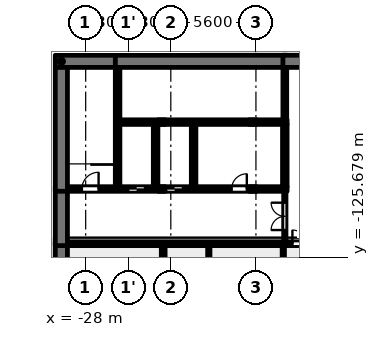
"""IFC4 building model, lengths in metres.
Left out: names, types, materials, properties, quantities, classifications, styles, units other than length and angle.
Written with IfcOpenShell. Run it as: python <this file> out.ifc"""

import sys

from ifc_helpers import new_model, si_unit, direction, frame, frame_2d, origin, origin_2d, place, context, subcontext, project, spatial, rectangle, extrude, element, fill, save


model = new_model("IFC4")
c1 = context("Model", 3, precision=1e-05, world=origin(), true_north=direction((0.0, 1.0)))
c2 = subcontext(c1, "Body", "Model", "MODEL_VIEW")
j1 = project(units=[si_unit("LENGTHUNIT", "METRE"), si_unit("PLANEANGLEUNIT", "RADIAN")], contexts=[c1])
p1 = place(None, origin())
s1 = spatial("IfcSite", under=j1, at=p1, CompositionType="ELEMENT")
p2 = place(p1, origin())
s2 = spatial("IfcBuilding", under=s1, at=p2, CompositionType="ELEMENT")
p3 = place(p2, frame((0.0, 0.0, 20.9)))
s3 = spatial("IfcBuildingStorey", under=s2, at=p3, CompositionType="ELEMENT", Elevation=20.9)
p4 = place(p3, frame((-29.2, -124.8, 0.0), z_axis=(0.0, 0.0, 1.0), x_axis=(1.0, 0.0, 0.0)))
e1 = element("IfcWall", 1, at=p4, inside=s3, PredefinedType="SOLIDWALL", context=c2, shape_type="SweptSolid", body=[
    extrude(rectangle(XDim=16.8, YDim=0.25, at=frame_2d((8.4, 0.0))), origin(), (0.0, 0.0, 1.0), 4.5),
])
p5 = place(p4, frame((14.8, 0.0, 0.0)))
e2 = element("IfcOpeningElement", 2, at=p5, cuts=e1, PredefinedType="OPENING", context=c2, shape_type="SweptSolid", body=[
    extrude(rectangle(XDim=1.8, YDim=2.1, at=frame_2d((0.9, 1.05))), frame((0.0, 0.135, 0.0), z_axis=(0.0, -1.0, 0.0), x_axis=(1.0, 0.0, 0.0)), (0.0, 0.0, 1.0), 0.27),
])
p6 = place(p3, frame((-29.2, -121.2, 0.0), z_axis=(0.0, 0.0, 1.0), x_axis=(1.0, 0.0, 0.0)))
e3 = element("IfcWall", 3, at=p6, inside=s3, PredefinedType="SOLIDWALL", context=c2, shape_type="SweptSolid", body=[
    extrude(rectangle(XDim=14.45, YDim=0.3, at=frame_2d((7.225, 0.0))), origin(), (0.0, 0.0, 1.0), 4.5),
])
p7 = place(p6, frame((4.0, 0.0, 0.0)))
e4 = element("IfcOpeningElement", 4, at=p7, cuts=e3, PredefinedType="OPENING", context=c2, shape_type="SweptSolid", body=[
    extrude(rectangle(XDim=1.1, YDim=2.1, at=frame_2d((0.55, 1.05))), frame((0.0, 0.16, 0.0), z_axis=(0.0, -1.0, 0.0), x_axis=(1.0, 0.0, 0.0)), (0.0, 0.0, 1.0), 0.32),
])
p8 = place(p6, frame((6.5, 0.0, 0.0)))
e5 = element("IfcOpeningElement", 5, at=p8, cuts=e3, PredefinedType="OPENING", context=c2, shape_type="SweptSolid", body=[
    extrude(rectangle(XDim=1.1, YDim=2.1, at=frame_2d((0.55, 1.05))), frame((0.0, 0.16, 0.0), z_axis=(0.0, -1.0, 0.0), x_axis=(1.0, 0.0, 0.0)), (0.0, 0.0, 1.0), 0.32),
])
p9 = place(p6, frame((0.95, 0.0, 0.0)))
e6 = element("IfcOpeningElement", 6, at=p9, cuts=e3, PredefinedType="OPENING", context=c2, shape_type="SweptSolid", body=[
    extrude(rectangle(XDim=1.1, YDim=2.1, at=frame_2d((0.55, 1.05))), frame((0.0, 0.16, 0.0), z_axis=(0.0, -1.0, 0.0), x_axis=(1.0, 0.0, 0.0)), (0.0, 0.0, 1.0), 0.32),
])
p10 = place(p6, frame((10.8, 0.0, 0.0)))
e7 = element("IfcOpeningElement", 7, at=p10, cuts=e3, PredefinedType="OPENING", context=c2, shape_type="SweptSolid", body=[
    extrude(rectangle(XDim=1.0, YDim=2.1, at=frame_2d((0.5, 1.05))), frame((0.0, 0.16, 0.0), z_axis=(0.0, -1.0, 0.0), x_axis=(1.0, 0.0, 0.0)), (0.0, 0.0, 1.0), 0.32),
])
p11 = place(p3, frame((-25.75, -116.8, 0.0), z_axis=(0.0, 0.0, 1.0), x_axis=(1.0, 0.0, 0.0)))
e8 = element("IfcWall", 8, at=p11, inside=s3, PredefinedType="SOLIDWALL", context=c2, shape_type="SweptSolid", body=[
    extrude(rectangle(XDim=11.0, YDim=0.3, at=frame_2d((5.5, 0.0))), origin(), (0.0, 0.0, 1.0), 4.5),
])
p12 = place(p3, frame((-30.0, -112.8, 0.0), z_axis=(0.0, 0.0, 1.0), x_axis=(1.0, 0.0, 0.0)))
e9 = element("IfcWall", 9, at=p12, inside=s3, PredefinedType="SOLIDWALL", context=c2, shape_type="SweptSolid", body=[
    extrude(rectangle(XDim=4.25, YDim=0.8, at=frame_2d((2.125, 0.0))), origin(), (0.0, 0.0, 1.0), 4.5),
])
p13 = place(p3, frame((-26.05, -112.8, 0.0), z_axis=(0.0, 0.0, 1.0), x_axis=(1.0, 0.0, 0.0)))
e10 = element("IfcWall", 10, at=p13, inside=s3, PredefinedType="SOLIDWALL", context=c2, shape_type="SweptSolid", body=[
    extrude(rectangle(XDim=11.275, YDim=0.8, at=frame_2d((5.637, 0.0))), origin(), (0.0, 0.0, 1.0), 4.5),
])
p14 = place(p3, frame((-15.025, -112.8, 0.0), z_axis=(0.0, 0.0, 1.0), x_axis=(1.0, 0.0, 0.0)))
e11 = element("IfcWall", 11, at=p14, inside=s3, PredefinedType="SOLIDWALL", context=c2, shape_type="SweptSolid", body=[
    extrude(rectangle(XDim=30.05, YDim=0.8, at=frame_2d((15.025, 0.0))), origin(), (0.0, 0.0, 1.0), 4.5),
])
p15 = place(p14, frame((2.125, 0.0, 0.9)))
e12 = element("IfcOpeningElement", 12, at=p15, cuts=e11, PredefinedType="OPENING", context=c2, shape_type="SweptSolid", body=[
    extrude(rectangle(XDim=1.8, YDim=1.5, at=frame_2d((0.9, 0.75))), frame((0.0, 0.41, 0.0), z_axis=(0.0, -1.0, 0.0), x_axis=(1.0, 0.0, 0.0)), (0.0, 0.0, 1.0), 0.82),
])
p16 = place(p14, frame((5.125, 0.0, 0.9)))
e13 = element("IfcOpeningElement", 13, at=p16, cuts=e11, PredefinedType="OPENING", context=c2, shape_type="SweptSolid", body=[
    extrude(rectangle(XDim=1.8, YDim=1.5, at=frame_2d((0.9, 0.75))), frame((0.0, 0.41, 0.0), z_axis=(0.0, -1.0, 0.0), x_axis=(1.0, 0.0, 0.0)), (0.0, 0.0, 1.0), 0.82),
])
p17 = place(p14, frame((8.125, 0.0, 0.9)))
e14 = element("IfcOpeningElement", 14, at=p17, cuts=e11, PredefinedType="OPENING", context=c2, shape_type="SweptSolid", body=[
    extrude(rectangle(XDim=1.8, YDim=1.5, at=frame_2d((0.9, 0.75))), frame((0.0, 0.41, 0.0), z_axis=(0.0, -1.0, 0.0), x_axis=(1.0, 0.0, 0.0)), (0.0, 0.0, 1.0), 0.82),
])
p18 = place(p14, frame((11.125, 0.0, 0.9)))
e15 = element("IfcOpeningElement", 15, at=p18, cuts=e11, PredefinedType="OPENING", context=c2, shape_type="SweptSolid", body=[
    extrude(rectangle(XDim=1.8, YDim=1.5, at=frame_2d((0.9, 0.75))), frame((0.0, 0.41, 0.0), z_axis=(0.0, -1.0, 0.0), x_axis=(1.0, 0.0, 0.0)), (0.0, 0.0, 1.0), 0.82),
])
p19 = place(p14, frame((14.125, 0.0, 0.9)))
e16 = element("IfcOpeningElement", 16, at=p19, cuts=e11, PredefinedType="OPENING", context=c2, shape_type="SweptSolid", body=[
    extrude(rectangle(XDim=1.8, YDim=1.5, at=frame_2d((0.9, 0.75))), frame((0.0, 0.41, 0.0), z_axis=(0.0, -1.0, 0.0), x_axis=(1.0, 0.0, 0.0)), (0.0, 0.0, 1.0), 0.82),
])
p20 = place(p14, frame((17.125, 0.0, 0.9)))
e17 = element("IfcOpeningElement", 17, at=p20, cuts=e11, PredefinedType="OPENING", context=c2, shape_type="SweptSolid", body=[
    extrude(rectangle(XDim=1.8, YDim=1.5, at=frame_2d((0.9, 0.75))), frame((0.0, 0.41, 0.0), z_axis=(0.0, -1.0, 0.0), x_axis=(1.0, 0.0, 0.0)), (0.0, 0.0, 1.0), 0.82),
])
p21 = place(p14, frame((20.125, 0.0, 0.9)))
e18 = element("IfcOpeningElement", 18, at=p21, cuts=e11, PredefinedType="OPENING", context=c2, shape_type="SweptSolid", body=[
    extrude(rectangle(XDim=1.8, YDim=1.5, at=frame_2d((0.9, 0.75))), frame((0.0, 0.41, 0.0), z_axis=(0.0, -1.0, 0.0), x_axis=(1.0, 0.0, 0.0)), (0.0, 0.0, 1.0), 0.82),
])
p22 = place(p14, frame((23.125, 0.0, 0.9)))
e19 = element("IfcOpeningElement", 19, at=p22, cuts=e11, PredefinedType="OPENING", context=c2, shape_type="SweptSolid", body=[
    extrude(rectangle(XDim=1.8, YDim=1.5, at=frame_2d((0.9, 0.75))), frame((0.0, 0.41, 0.0), z_axis=(0.0, -1.0, 0.0), x_axis=(1.0, 0.0, 0.0)), (0.0, 0.0, 1.0), 0.82),
])
p23 = place(p14, frame((26.125, 0.0, 0.9)))
e20 = element("IfcOpeningElement", 20, at=p23, cuts=e11, PredefinedType="OPENING", context=c2, shape_type="SweptSolid", body=[
    extrude(rectangle(XDim=1.8, YDim=1.5, at=frame_2d((0.9, 0.75))), frame((0.0, 0.41, 0.0), z_axis=(0.0, -1.0, 0.0), x_axis=(1.0, 0.0, 0.0)), (0.0, 0.0, 1.0), 0.82),
])
p24 = place(p3, frame((-29.6, -131.325, 0.0), z_axis=(0.0, 0.0, 1.0), x_axis=(0.0, 1.0, 0.0)))
e21 = element("IfcWall", 21, at=p24, inside=s3, PredefinedType="SOLIDWALL", context=c2, shape_type="SweptSolid", body=[
    extrude(rectangle(XDim=6.65, YDim=0.8, at=frame_2d((3.325, 0.0))), origin(), (0.0, 0.0, 1.0), 4.5),
])
p25 = place(p3, frame((-29.6, -124.925, 0.0), z_axis=(0.0, 0.0, 1.0), x_axis=(0.0, 1.0, 0.0)))
e22 = element("IfcWall", 22, at=p25, inside=s3, PredefinedType="SOLIDWALL", context=c2, shape_type="SweptSolid", body=[
    extrude(rectangle(XDim=3.875, YDim=0.8, at=frame_2d((1.938, 0.0))), origin(), (0.0, 0.0, 1.0), 4.5),
])
p26 = place(p3, frame((-29.6, -121.35, 0.0), z_axis=(0.0, 0.0, 1.0), x_axis=(0.0, 1.0, 0.0)))
e23 = element("IfcWall", 23, at=p26, inside=s3, PredefinedType="SOLIDWALL", context=c2, shape_type="SweptSolid", body=[
    extrude(rectangle(XDim=8.15, YDim=0.8, at=frame_2d((4.075, 0.0))), origin(), (0.0, 0.0, 1.0), 4.5),
])
p27 = place(p3, frame((-25.9, -121.05, 0.0), z_axis=(0.0, 0.0, 1.0), x_axis=(0.0, 1.0, 0.0)))
e24 = element("IfcWall", 24, at=p27, inside=s3, PredefinedType="SOLIDWALL", context=c2, shape_type="SweptSolid", body=[
    extrude(rectangle(XDim=7.85, YDim=0.3, at=frame_2d((3.925, 0.0))), origin(), (0.0, 0.0, 1.0), 4.5),
])
p28 = place(p3, frame((-23.4, -121.05, 0.0), z_axis=(0.0, 0.0, 1.0), x_axis=(0.0, 1.0, 0.0)))
e25 = element("IfcWall", 25, at=p28, inside=s3, PredefinedType="SOLIDWALL", context=c2, shape_type="SweptSolid", body=[
    extrude(rectangle(XDim=4.1, YDim=0.3, at=frame_2d((2.05, 0.0))), origin(), (0.0, 0.0, 1.0), 4.5),
])
p29 = place(p3, frame((-22.9, -131.075, 0.0), z_axis=(0.0, 0.0, 1.0), x_axis=(0.0, 1.0, 0.0)))
e26 = element("IfcWall", 26, at=p29, inside=s3, PredefinedType="SOLIDWALL", context=c2, shape_type="SweptSolid", body=[
    extrude(rectangle(XDim=6.15, YDim=0.25, at=frame_2d((3.075, 0.0))), origin(), (0.0, 0.0, 1.0), 4.5),
])
p30 = place(p3, frame((-20.9, -121.05, 0.0), z_axis=(0.0, 0.0, 1.0), x_axis=(0.0, 1.0, 0.0)))
e27 = element("IfcWall", 27, at=p30, inside=s3, PredefinedType="SOLIDWALL", context=c2, shape_type="SweptSolid", body=[
    extrude(rectangle(XDim=4.1, YDim=0.3, at=frame_2d((2.05, 0.0))), origin(), (0.0, 0.0, 1.0), 4.5),
])
for number, where, z_axis, x_axis in (
    (28, (-19.9, -131.075, 0.0), (0.0, 0.0, 1.0), (0.0, 1.0, 0.0)),
    (29, (-15.0, -131.075, 0.0), (0.0, 0.0, 1.0), (0.0, 1.0, 0.0)),
):
    element("IfcWall", number, at=place(p3, frame(where, z_axis=z_axis, x_axis=x_axis)), inside=s3, PredefinedType="PARTITIONING", context=c2, shape_type="SweptSolid", body=[
        extrude(rectangle(XDim=6.15, YDim=0.15, at=frame_2d((3.075, 0.0))), origin(), (0.0, 0.0, 1.0), 4.5),
    ])
p31 = place(p3, frame((-14.9, -124.675, 0.0), z_axis=(0.0, 0.0, 1.0), x_axis=(0.0, 1.0, 0.0)))
e30 = element("IfcWall", 30, at=p31, inside=s3, PredefinedType="PARTITIONING", context=c2, shape_type="SweptSolid", body=[
    extrude(rectangle(XDim=3.325, YDim=0.15, at=frame_2d((1.663, 0.0))), origin(), (0.0, 0.0, 1.0), 4.5),
])
p32 = place(p31, frame((0.775, 0.0, 0.0)))
e31 = element("IfcOpeningElement", 31, at=p32, cuts=e30, PredefinedType="OPENING", context=c2, shape_type="SweptSolid", body=[
    extrude(rectangle(XDim=1.8, YDim=2.1, at=frame_2d((0.9, 1.05))), frame((0.0, 0.085, 0.0), z_axis=(0.0, -1.0, 0.0), x_axis=(1.0, 0.0, 0.0)), (0.0, 0.0, 1.0), 0.17),
])
p33 = place(p3, frame((-14.9, -121.05, 0.0), z_axis=(0.0, 0.0, 1.0), x_axis=(0.0, 1.0, 0.0)))
e32 = element("IfcWall", 32, at=p33, inside=s3, PredefinedType="SOLIDWALL", context=c2, shape_type="SweptSolid", body=[
    extrude(rectangle(XDim=4.1, YDim=0.3, at=frame_2d((2.05, 0.0))), origin(), (0.0, 0.0, 1.0), 4.5),
])
p34 = place(p3, frame((-14.9, -116.65, 0.0), z_axis=(0.0, 0.0, 1.0), x_axis=(0.0, 1.0, 0.0)))
e33 = element("IfcWall", 33, at=p34, inside=s3, PredefinedType="SOLIDWALL", context=c2, shape_type="SweptSolid", body=[
    extrude(rectangle(XDim=3.45, YDim=0.25, at=frame_2d((1.725, 0.0))), origin(), (0.0, 0.0, 1.0), 4.5),
])
p35 = place(p3, frame((-29.85, -159.85, 4.8), z_axis=(0.0, 0.0, 1.0), x_axis=(0.0, 1.0, 0.0)))
e34 = element("IfcWall", 34, at=p35, inside=s3, PredefinedType="PARAPET", context=c2, shape_type="SweptSolid", body=[
    extrude(rectangle(XDim=35.45, YDim=0.3, at=frame_2d((17.725, 0.0))), origin(), (0.0, 0.0, 1.0), 1.0),
])
for number, where, z_axis, x_axis in (
    (35, (-23.0, -121.2, 4.5), (0.0, 0.0, 1.0), (1.0, 0.0, 0.0)),
    (36, (-17.0, -121.2, 4.5), (0.0, 0.0, 1.0), (1.0, 0.0, 0.0)),
):
    element("IfcColumn", number, at=place(p3, frame(where, z_axis=z_axis, x_axis=x_axis)), inside=s3, PredefinedType="COLUMN", context=c2, shape_type="SweptSolid", body=[
        extrude(rectangle(XDim=0.3, YDim=0.3, at=origin_2d()), origin(), (0.0, 0.0, 1.0), 1.937),
    ])
for number, where, z_axis, x_axis in (
    (37, (-23.0, -116.8, 4.5), (0.0, 0.0, 1.0), (1.0, 0.0, 0.0)),
    (38, (-17.0, -116.8, 4.5), (0.0, 0.0, 1.0), (1.0, 0.0, 0.0)),
):
    element("IfcColumn", number, at=place(p3, frame(where, z_axis=z_axis, x_axis=x_axis)), inside=s3, PredefinedType="COLUMN", context=c2, shape_type="SweptSolid", body=[
        extrude(rectangle(XDim=0.3, YDim=0.3, at=origin_2d()), origin(), (0.0, 0.0, 1.0), 2.252),
    ])
p36 = place(p7, origin())
e39 = element("IfcDoor", 39, at=p36, inside=s3, OperationType="DOUBLE_DOOR_SLIDING", PredefinedType="DOOR", context=c2, shape_type="SweptSolid", body=[
    extrude(rectangle(XDim=1.1, YDim=2.1, at=frame_2d((0.55, 1.05))), frame((0.0, 0.025, 0.0), z_axis=(0.0, -1.0, 0.0), x_axis=(1.0, 0.0, 0.0)), (0.0, 0.0, 1.0), 0.05),
])
fill(e4, e39)
p37 = place(p8, origin())
e40 = element("IfcDoor", 40, at=p37, inside=s3, OperationType="DOUBLE_DOOR_SLIDING", PredefinedType="DOOR", context=c2, shape_type="SweptSolid", body=[
    extrude(rectangle(XDim=1.1, YDim=2.1, at=frame_2d((0.55, 1.05))), frame((0.0, 0.025, 0.0), z_axis=(0.0, -1.0, 0.0), x_axis=(1.0, 0.0, 0.0)), (0.0, 0.0, 1.0), 0.05),
])
fill(e5, e40)
p38 = place(p9, origin())
e41 = element("IfcDoor", 41, at=p38, inside=s3, OperationType="SINGLE_SWING_RIGHT", PredefinedType="DOOR", context=c2, shape_type="SweptSolid", body=[
    extrude(rectangle(XDim=1.1, YDim=2.1, at=frame_2d((0.55, 1.05))), frame((0.0, 0.025, 0.0), z_axis=(0.0, -1.0, 0.0), x_axis=(1.0, 0.0, 0.0)), (0.0, 0.0, 1.0), 0.05),
])
fill(e6, e41)
p39 = place(p10, origin())
e42 = element("IfcDoor", 42, at=p39, inside=s3, OperationType="SINGLE_SWING_RIGHT", PredefinedType="DOOR", context=c2, shape_type="SweptSolid", body=[
    extrude(rectangle(XDim=1.0, YDim=2.1, at=frame_2d((0.5, 1.05))), frame((0.0, 0.025, 0.0), z_axis=(0.0, -1.0, 0.0), x_axis=(1.0, 0.0, 0.0)), (0.0, 0.0, 1.0), 0.05),
])
fill(e7, e42)
p40 = place(p32, origin())
e43 = element("IfcDoor", 43, at=p40, inside=s3, OperationType="DOUBLE_DOOR_SINGLE_SWING", PredefinedType="DOOR", context=c2, shape_type="SweptSolid", body=[
    extrude(rectangle(XDim=1.8, YDim=2.1, at=frame_2d((0.9, 1.05))), frame((0.0, 0.025, 0.0), z_axis=(0.0, -1.0, 0.0), x_axis=(1.0, 0.0, 0.0)), (0.0, 0.0, 1.0), 0.05),
])
fill(e31, e43)
p41 = place(p5, origin())
e44 = element("IfcDoor", 44, at=p41, inside=s3, OperationType="DOUBLE_DOOR_SINGLE_SWING", PredefinedType="DOOR", context=c2, shape_type="SweptSolid", body=[
    extrude(rectangle(XDim=1.8, YDim=2.1, at=frame_2d((0.9, 1.05))), frame((0.0, 0.025, 0.0), z_axis=(0.0, -1.0, 0.0), x_axis=(1.0, 0.0, 0.0)), (0.0, 0.0, 1.0), 0.05),
])
fill(e2, e44)
save(model, sys.argv[1])
